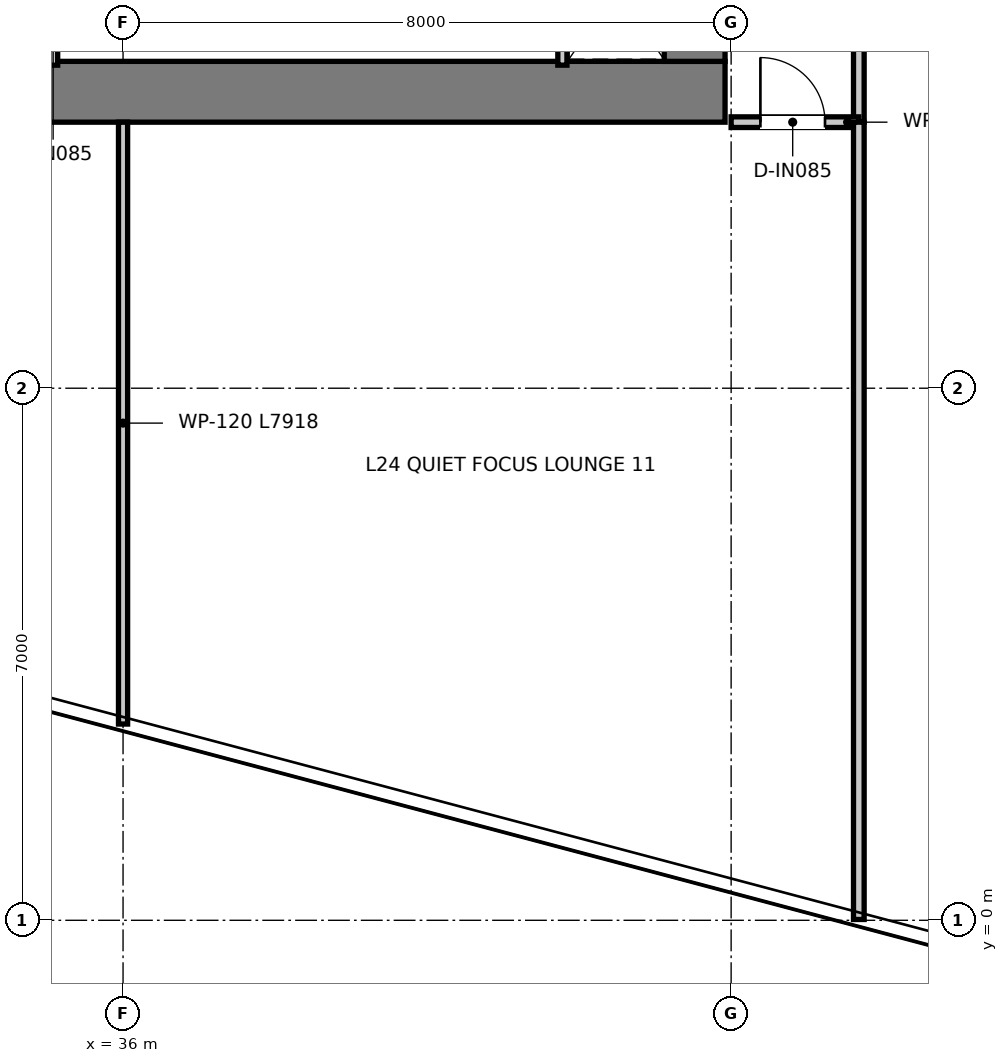
"""IFC4 building model, lengths in metres.
Left out: names, types, materials, properties, quantities, classifications, styles, units other than length and angle.
Written with IfcOpenShell. Run it as: python <this file> out.ifc"""

import sys

from ifc_helpers import new_model, si_unit, direction, frame, frame_2d, origin, place, context, subcontext, project, spatial, rectangle, extrude, element, fill, save


model = new_model("IFC4")
c1 = context("Model", 3, precision=1e-05, world=origin(), true_north=direction((0.0, 1.0)))
c2 = subcontext(c1, "Body", "Model", "MODEL_VIEW")
j1 = project(units=[si_unit("LENGTHUNIT", "METRE"), si_unit("PLANEANGLEUNIT", "RADIAN")], contexts=[c1])
p1 = place(None, origin())
s1 = spatial("IfcSite", under=j1, at=p1, CompositionType="ELEMENT")
p2 = place(p1, origin())
s2 = spatial("IfcBuilding", under=s1, at=p2, CompositionType="ELEMENT")
p3 = place(p2, frame((0.0, 0.0, 101.9)))
s3 = spatial("IfcBuildingStorey", under=s2, at=p3, CompositionType="ELEMENT", Elevation=101.9)
p4 = place(p3, frame((28.08, 10.9, 0.0), z_axis=(0.0, 0.0, 1.0), x_axis=(1.0, 0.0, 0.0)))
e1 = element("IfcWall", 1, at=p4, inside=s3, PredefinedType="SHEAR", context=c2, shape_type="SweptSolid", body=[
    extrude(rectangle(XDim=15.84, YDim=0.8, at=frame_2d((7.92, 0.0))), origin(), (0.0, 0.0, 1.0), 3.95),
])
p5 = place(p3, frame((43.52, 11.3, 0.0), z_axis=(0.0, 0.0, 1.0), x_axis=(0.0, 1.0, 0.0)))
e2 = element("IfcWall", 2, at=p5, inside=s3, PredefinedType="SHEAR", context=c2, shape_type="SweptSolid", body=[
    extrude(rectangle(XDim=14.7, YDim=0.8, at=frame_2d((7.35, 0.0))), origin(), (0.0, 0.0, 1.0), 3.95),
])
p6 = place(p3, frame((41.78, 11.25, 0.0), z_axis=(0.0, 0.0, 1.0), x_axis=(0.0, 1.0, 0.0)))
e3 = element("IfcWall", 3, at=p6, inside=s3, PredefinedType="PARTITIONING", context=c2, shape_type="SweptSolid", body=[
    extrude(rectangle(XDim=1.97, YDim=0.12, at=frame_2d((0.985, 0.0))), origin(), (0.0, 0.0, 1.0), 3.67),
])
p7 = place(p3, frame((35.08, 11.25, 0.0), z_axis=(0.0, 0.0, 1.0), x_axis=(0.0, 1.0, 0.0)))
e4 = element("IfcWall", 4, at=p7, inside=s3, PredefinedType="PARTITIONING", context=c2, shape_type="SweptSolid", body=[
    extrude(rectangle(XDim=1.97, YDim=0.12, at=frame_2d((0.985, 0.0))), origin(), (0.0, 0.0, 1.0), 3.67),
])
p8 = place(p7, frame((0.545, 0.0, 0.0)))
e5 = element("IfcOpeningElement", 5, at=p8, cuts=e4, PredefinedType="OPENING", context=c2, shape_type="SweptSolid", body=[
    extrude(rectangle(XDim=0.85, YDim=2.1, at=frame_2d((0.425, 1.05))), frame((0.0, 0.07, 0.0), z_axis=(0.0, -1.0, 0.0), x_axis=(1.0, 0.0, 0.0)), (0.0, 0.0, 1.0), 0.14),
])
p9 = place(p3, frame((45.68, 10.5, 0.0), z_axis=(0.0, 0.0, 1.0), x_axis=(0.0, 1.0, 0.0)))
e6 = element("IfcWall", 6, at=p9, inside=s3, PredefinedType="PARTITIONING", context=c2, shape_type="SweptSolid", body=[
    extrude(rectangle(XDim=25.62, YDim=0.14, at=frame_2d((12.81, 0.0))), origin(), (0.0, 0.0, 1.0), 2.97),
])
p10 = place(p9, frame((8.275, 0.0, 0.0)))
e7 = element("IfcOpeningElement", 7, at=p10, cuts=e6, PredefinedType="OPENING", context=c2, shape_type="SweptSolid", body=[
    extrude(rectangle(XDim=0.95, YDim=2.1, at=frame_2d((0.475, 1.05))), frame((0.0, 0.08, 0.0), z_axis=(0.0, -1.0, 0.0), x_axis=(1.0, 0.0, 0.0)), (0.0, 0.0, 1.0), 0.16),
])
p11 = place(p9, frame((14.025, 0.0, 0.0)))
e8 = element("IfcOpeningElement", 8, at=p11, cuts=e6, PredefinedType="OPENING", context=c2, shape_type="SweptSolid", body=[
    extrude(rectangle(XDim=0.95, YDim=2.1, at=frame_2d((0.475, 1.05))), frame((0.0, 0.08, 0.0), z_axis=(0.0, -1.0, 0.0), x_axis=(1.0, 0.0, 0.0)), (0.0, 0.0, 1.0), 0.16),
])
p12 = place(p9, frame((20.875, 0.0, 0.0)))
e9 = element("IfcOpeningElement", 9, at=p12, cuts=e6, PredefinedType="OPENING", context=c2, shape_type="SweptSolid", body=[
    extrude(rectangle(XDim=0.95, YDim=2.1, at=frame_2d((0.475, 1.05))), frame((0.0, 0.08, 0.0), z_axis=(0.0, -1.0, 0.0), x_axis=(1.0, 0.0, 0.0)), (0.0, 0.0, 1.0), 0.16),
])
p13 = place(p3, frame((44.0, 10.5, 0.0), z_axis=(0.0, 0.0, 1.0), x_axis=(1.0, 0.0, 0.0)))
e10 = element("IfcWall", 10, at=p13, inside=s3, PredefinedType="PARTITIONING", context=c2, shape_type="SweptSolid", body=[
    extrude(rectangle(XDim=1.68, YDim=0.14, at=frame_2d((0.84, 0.0))), origin(), (0.0, 0.0, 1.0), 3.67),
])
p14 = place(p13, frame((0.385, 0.0, 0.0)))
e11 = element("IfcOpeningElement", 11, at=p14, cuts=e10, PredefinedType="OPENING", context=c2, shape_type="SweptSolid", body=[
    extrude(rectangle(XDim=0.85, YDim=2.1, at=frame_2d((0.425, 1.05))), frame((0.0, 0.08, 0.0), z_axis=(0.0, -1.0, 0.0), x_axis=(1.0, 0.0, 0.0)), (0.0, 0.0, 1.0), 0.16),
])
p15 = place(p3, frame((45.68, 0.01, 0.0), z_axis=(0.0, 0.0, 1.0), x_axis=(0.0, 1.0, 0.0)))
e12 = element("IfcWall", 12, at=p15, inside=s3, PredefinedType="PARTITIONING", context=c2, shape_type="SweptSolid", body=[
    extrude(rectangle(XDim=10.49, YDim=0.14, at=frame_2d((5.245, 0.0))), origin(), (0.0, 0.0, 1.0), 3.67),
])
p16 = place(p3, frame((36.0, 2.582, 0.0), z_axis=(0.0, 0.0, 1.0), x_axis=(0.0, 1.0, 0.0)))
e13 = element("IfcWall", 13, at=p16, inside=s3, PredefinedType="PARTITIONING", context=c2, shape_type="SweptSolid", body=[
    extrude(rectangle(XDim=7.918, YDim=0.12, at=frame_2d((3.959, 0.0))), origin(), (0.0, 0.0, 1.0), 3.67),
])
p17 = place(p14, origin())
e14 = element("IfcDoor", 14, at=p17, inside=s3, OperationType="SINGLE_SWING_LEFT", PredefinedType="DOOR", context=c2, shape_type="SweptSolid", body=[
    extrude(rectangle(XDim=0.85, YDim=2.1, at=frame_2d((0.425, 1.05))), frame((0.0, 0.025, 0.0), z_axis=(0.0, -1.0, 0.0), x_axis=(1.0, 0.0, 0.0)), (0.0, 0.0, 1.0), 0.05),
])
fill(e11, e14)
save(model, sys.argv[1])
